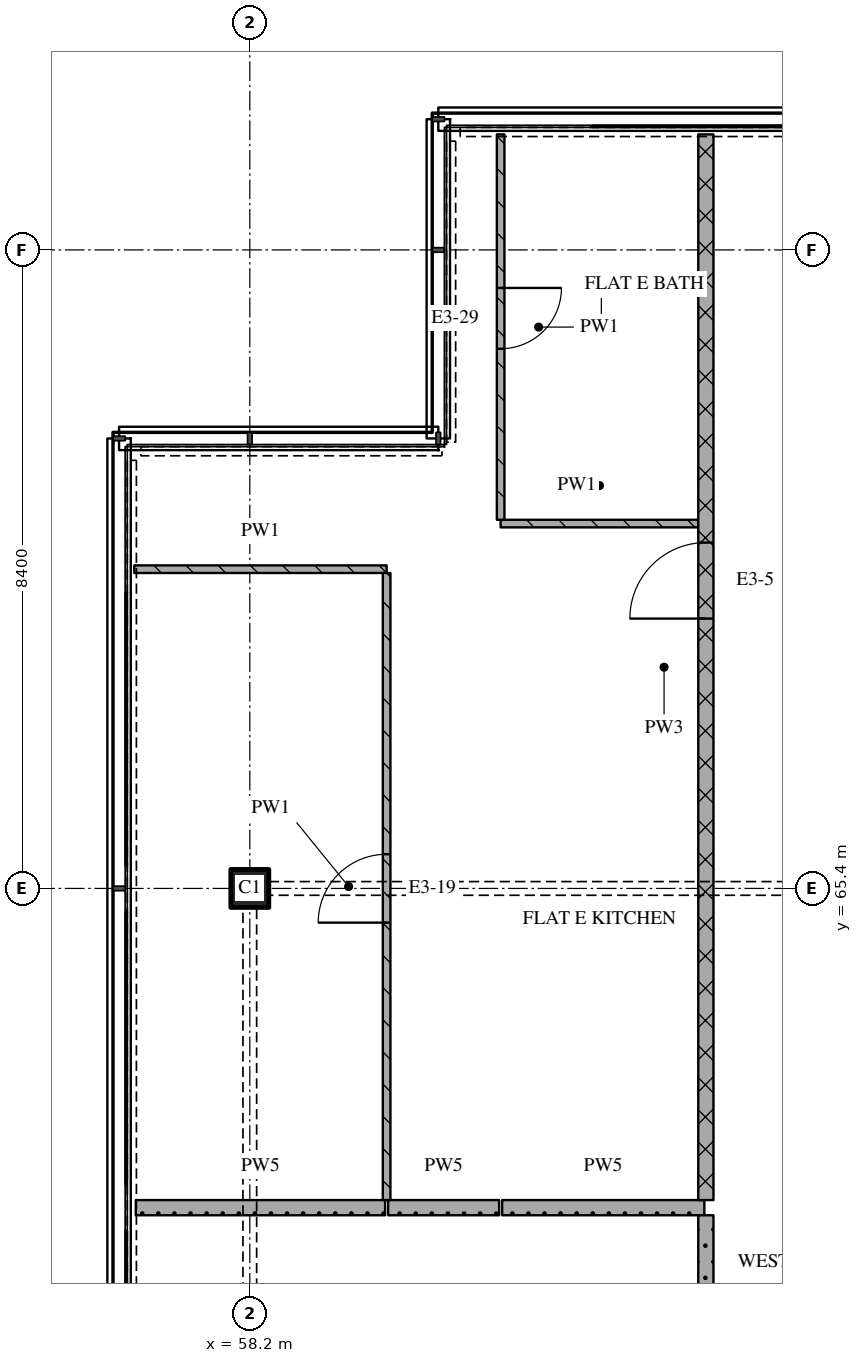
"""IFC4 building model, lengths in metres.
Left out: names, types, materials, properties, quantities, classifications, styles, units other than length and angle.
Written with IfcOpenShell. Run it as: python <this file> out.ifc"""

import sys

from ifc_helpers import new_model, si_unit, direction, frame, frame_2d, origin, origin_2d, place, context, subcontext, project, spatial, rectangle, extrude, element, fill, save


model = new_model("IFC4")
c1 = context("Model", 3, precision=1e-05, world=origin(), true_north=direction((0.0, 1.0)))
c2 = subcontext(c1, "Body", "Model", "MODEL_VIEW")
j1 = project(units=[si_unit("LENGTHUNIT", "METRE"), si_unit("PLANEANGLEUNIT", "RADIAN")], contexts=[c1])
p1 = place(None, origin())
s1 = spatial("IfcSite", under=j1, at=p1, CompositionType="ELEMENT")
p2 = place(p1, origin())
s2 = spatial("IfcBuilding", under=s1, at=p2, CompositionType="ELEMENT")
p3 = place(p2, frame((0.0, 0.0, 281.55)))
s3 = spatial("IfcBuildingStorey", under=s2, at=p3, CompositionType="ELEMENT", Elevation=281.55)
p4 = place(p3, frame((58.2, 65.4, 0.0), z_axis=(0.0, 0.0, 1.0), x_axis=(1.0, 0.0, 0.0)))
e1 = element("IfcColumn", 1, at=p4, inside=s3, PredefinedType="COLUMN", context=c2, shape_type="SweptSolid", body=[
    extrude(rectangle(XDim=0.5, YDim=0.5, at=origin_2d()), origin(), (0.0, 0.0, 1.0), 3.6),
])
p5 = place(p3, frame((56.7, 61.2, 0.0), z_axis=(0.0, 0.0, 1.0), x_axis=(1.0, 0.0, 0.0)))
e2 = element("IfcWall", 2, at=p5, inside=s3, PredefinedType="PARTITIONING", context=c2, shape_type="SweptSolid", body=[
    extrude(rectangle(XDim=3.28, YDim=0.2, at=frame_2d((1.64, 0.0))), origin(), (0.0, 0.0, 1.0), 3.32),
])
p6 = place(p3, frame((60.02, 61.2, 0.0), z_axis=(0.0, 0.0, 1.0), x_axis=(1.0, 0.0, 0.0)))
e3 = element("IfcWall", 3, at=p6, inside=s3, PredefinedType="PARTITIONING", context=c2, shape_type="SweptSolid", body=[
    extrude(rectangle(XDim=1.46, YDim=0.2, at=frame_2d((0.73, 0.0))), origin(), (0.0, 0.0, 1.0), 3.32),
])
p7 = place(p3, frame((61.52, 61.2, 0.0), z_axis=(0.0, 0.0, 1.0), x_axis=(1.0, 0.0, 0.0)))
e4 = element("IfcWall", 4, at=p7, inside=s3, PredefinedType="PARTITIONING", context=c2, shape_type="SweptSolid", body=[
    extrude(rectangle(XDim=2.66, YDim=0.2, at=frame_2d((1.33, 0.0))), origin(), (0.0, 0.0, 1.0), 3.32),
])
p8 = place(p3, frame((56.68, 69.6, 0.0), z_axis=(0.0, 0.0, 1.0), x_axis=(1.0, 0.0, 0.0)))
e5 = element("IfcWall", 5, at=p8, inside=s3, PredefinedType="PARTITIONING", context=c2, shape_type="SweptSolid", body=[
    extrude(rectangle(XDim=3.32, YDim=0.1, at=frame_2d((1.66, 0.0))), origin(), (0.0, 0.0, 1.0), 3.32),
])
p9 = place(p3, frame((61.5, 70.2, 0.0), z_axis=(0.0, 0.0, 1.0), x_axis=(1.0, 0.0, 0.0)))
e6 = element("IfcWall", 6, at=p9, inside=s3, PredefinedType="PARTITIONING", context=c2, shape_type="SweptSolid", body=[
    extrude(rectangle(XDim=2.6, YDim=0.1, at=frame_2d((1.3, 0.0))), origin(), (0.0, 0.0, 1.0), 3.32),
])
p10 = place(p3, frame((60.0, 61.3, 0.0), z_axis=(0.0, 0.0, 1.0), x_axis=(0.0, 1.0, 0.0)))
e7 = element("IfcWall", 7, at=p10, inside=s3, PredefinedType="PARTITIONING", context=c2, shape_type="SweptSolid", body=[
    extrude(rectangle(XDim=8.25, YDim=0.1, at=frame_2d((4.125, 0.0))), origin(), (0.0, 0.0, 1.0), 3.32),
])
p11 = place(p10, frame((3.65, 0.0, 0.0)))
e8 = element("IfcOpeningElement", 8, at=p11, cuts=e7, PredefinedType="OPENING", context=c2, shape_type="SweptSolid", body=[
    extrude(rectangle(XDim=0.9, YDim=2.1, at=frame_2d((0.45, 1.05))), frame((0.0, 0.06, 0.0), z_axis=(0.0, -1.0, 0.0), x_axis=(1.0, 0.0, 0.0)), (0.0, 0.0, 1.0), 0.12),
])
p12 = place(p3, frame((61.5, 75.32, 0.0), z_axis=(0.0, 0.0, 1.0), x_axis=(0.0, -1.0, 0.0)))
e9 = element("IfcWall", 9, at=p12, inside=s3, PredefinedType="PARTITIONING", context=c2, shape_type="SweptSolid", body=[
    extrude(rectangle(XDim=5.07, YDim=0.1, at=frame_2d((2.535, 0.0))), origin(), (0.0, 0.0, 1.0), 3.32),
])
p13 = place(p12, frame((2.02, 0.0, 0.0)))
e10 = element("IfcOpeningElement", 10, at=p13, cuts=e9, PredefinedType="OPENING", context=c2, shape_type="SweptSolid", body=[
    extrude(rectangle(XDim=0.8, YDim=2.1, at=frame_2d((0.4, 1.05))), frame((0.0, 0.06, 0.0), z_axis=(0.0, -1.0, 0.0), x_axis=(1.0, 0.0, 0.0)), (0.0, 0.0, 1.0), 0.12),
])
p14 = place(p3, frame((64.2, 61.3, 0.0), z_axis=(0.0, 0.0, 1.0), x_axis=(0.0, 1.0, 0.0)))
e11 = element("IfcWall", 11, at=p14, inside=s3, PredefinedType="PARTITIONING", context=c2, shape_type="SweptSolid", body=[
    extrude(rectangle(XDim=14.02, YDim=0.2, at=frame_2d((7.01, 0.0))), origin(), (0.0, 0.0, 1.0), 3.32),
])
p15 = place(p14, frame((7.65, 0.0, 0.0)))
e12 = element("IfcOpeningElement", 12, at=p15, cuts=e11, PredefinedType="OPENING", context=c2, shape_type="SweptSolid", body=[
    extrude(rectangle(XDim=1.0, YDim=2.1, at=frame_2d((0.5, 1.05))), frame((0.0, 0.11, 0.0), z_axis=(0.0, -1.0, 0.0), x_axis=(1.0, 0.0, 0.0)), (0.0, 0.0, 1.0), 0.22),
])
p16 = place(p3, frame((64.2, 61.1, 0.0), z_axis=(0.0, 0.0, 1.0), x_axis=(0.0, -1.0, 0.0)))
e13 = element("IfcWall", 13, at=p16, inside=s3, PredefinedType="PARTITIONING", context=c2, shape_type="SweptSolid", body=[
    extrude(rectangle(XDim=2.2, YDim=0.2, at=frame_2d((1.1, 0.0))), origin(), (0.0, 0.0, 1.0), 3.32),
])
p17 = place(p11, origin())
e14 = element("IfcDoor", 14, at=p17, inside=s3, OperationType="SINGLE_SWING_LEFT", PredefinedType="DOOR", context=c2, shape_type="SweptSolid", body=[
    extrude(rectangle(XDim=0.9, YDim=2.1, at=frame_2d((0.45, 1.05))), frame((0.0, 0.025, 0.0), z_axis=(0.0, -1.0, 0.0), x_axis=(1.0, 0.0, 0.0)), (0.0, 0.0, 1.0), 0.05),
])
fill(e8, e14)
p18 = place(p13, origin())
e15 = element("IfcDoor", 15, at=p18, inside=s3, OperationType="SINGLE_SWING_LEFT", PredefinedType="DOOR", context=c2, shape_type="SweptSolid", body=[
    extrude(rectangle(XDim=0.8, YDim=2.1, at=frame_2d((0.4, 1.05))), frame((0.0, 0.025, 0.0), z_axis=(0.0, -1.0, 0.0), x_axis=(1.0, 0.0, 0.0)), (0.0, 0.0, 1.0), 0.05),
])
fill(e10, e15)
p19 = place(p15, origin())
e16 = element("IfcDoor", 16, at=p19, inside=s3, OperationType="SINGLE_SWING_LEFT", PredefinedType="DOOR", context=c2, shape_type="SweptSolid", body=[
    extrude(rectangle(XDim=1.0, YDim=2.1, at=frame_2d((0.5, 1.05))), frame((0.0, 0.025, 0.0), z_axis=(0.0, -1.0, 0.0), x_axis=(1.0, 0.0, 0.0)), (0.0, 0.0, 1.0), 0.05),
])
fill(e12, e16)
save(model, sys.argv[1])
